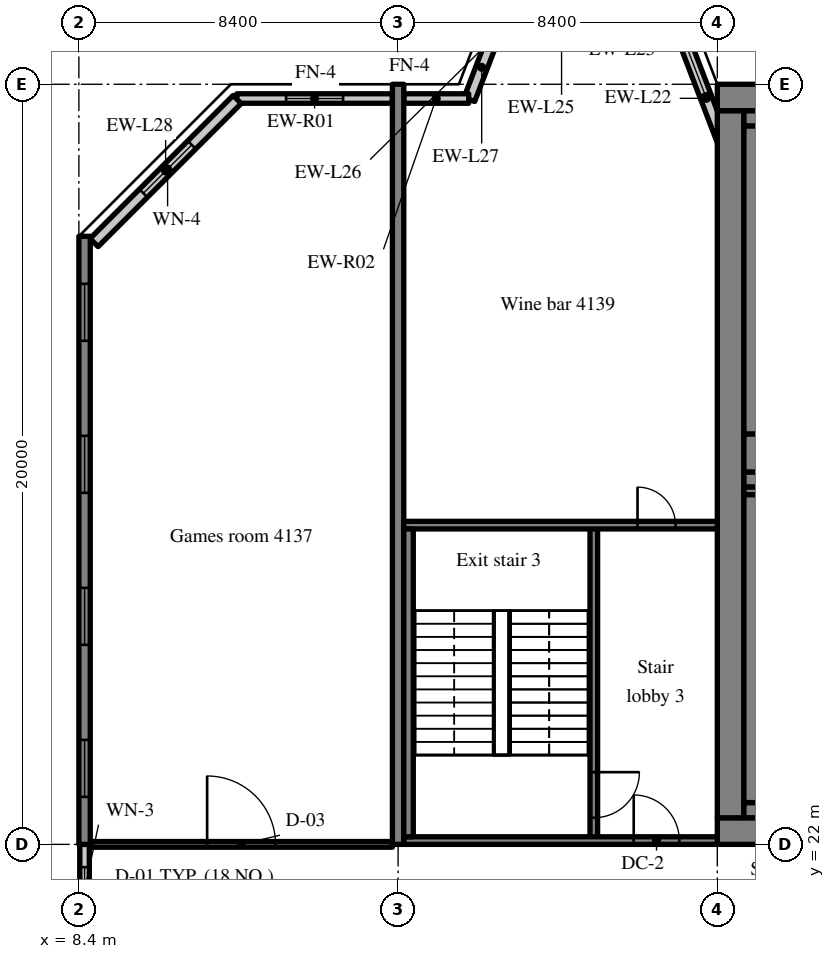
"""IFC4 building model, lengths in metres.
Left out: names, types, materials, properties, quantities, classifications, styles, units other than length and angle.
Written with IfcOpenShell. Run it as: python <this file> out.ifc"""

import sys

from ifc_helpers import new_model, si_unit, direction, frame, frame_2d, origin, place, context, subcontext, project, spatial, rectangle, extrude, source, transform, mapped, element, fill, save


model = new_model("IFC4")
c1 = context("Model", 3, precision=1e-05, world=origin(), true_north=direction((0.0, 1.0)))
c2 = subcontext(c1, "Body", "Model", "MODEL_VIEW")
j1 = project(units=[si_unit("LENGTHUNIT", "METRE"), si_unit("PLANEANGLEUNIT", "RADIAN")], contexts=[c1])
p1 = place(None, origin())
s1 = spatial("IfcSite", under=j1, at=p1, CompositionType="ELEMENT")
p2 = place(p1, origin())
s2 = spatial("IfcBuilding", under=s1, at=p2, CompositionType="ELEMENT")
p3 = place(p2, frame((0.0, 0.0, 170.6)))
s3 = spatial("IfcBuildingStorey", under=s2, at=p3, CompositionType="ELEMENT", Elevation=170.6)
m1 = source(origin(), c2, "Body", "SweptSolid", [
    extrude(rectangle(XDim=50.4, YDim=0.7, at=frame_2d((25.2, 0.0))), origin(), (0.0, 0.0, 1.0), 3.52),
])
p4 = place(p3, frame((25.2, 22.35, 0.0), z_axis=(0.0, 0.0, 1.0), x_axis=(1.0, 0.0, 0.0)))
e1 = element("IfcWall", 1, at=p4, inside=s3, PredefinedType="SHEAR", context=c2, shape_type="MappedRepresentation", body=[
    mapped(m1, transform((0.0, 0.0, 0.0), scale=1.0)),
])
m2 = source(origin(), c2, "Body", "SweptSolid", [
    extrude(rectangle(XDim=1.8, YDim=2.1, at=frame_2d((0.9, 1.05))), frame((0.0, 0.36, 0.0), z_axis=(0.0, -1.0, 0.0), x_axis=(1.0, 0.0, 0.0)), (0.0, 0.0, 1.0), 0.72),
])
p5 = place(p4, frame((15.9, 0.0, 0.0)))
e2 = element("IfcOpeningElement", 2, at=p5, cuts=e1, PredefinedType="OPENING", context=c2, shape_type="MappedRepresentation", body=[
    mapped(m2, transform((0.0, 0.0, 0.0), scale=1.0)),
])
m3 = source(origin(), c2, "Body", "SweptSolid", [
    extrude(rectangle(XDim=0.9, YDim=2.1, at=frame_2d((0.45, 1.05))), frame((0.0, 0.36, 0.0), z_axis=(0.0, -1.0, 0.0), x_axis=(1.0, 0.0, 0.0)), (0.0, 0.0, 1.0), 0.72),
])
p6 = place(p4, frame((9.7, 0.0, 0.0)))
e3 = element("IfcOpeningElement", 3, at=p6, cuts=e1, PredefinedType="OPENING", context=c2, shape_type="MappedRepresentation", body=[
    mapped(m3, transform((0.0, 0.0, 0.0), scale=1.0)),
])
p7 = place(p4, frame((21.5, 0.0, 0.0)))
e4 = element("IfcOpeningElement", 4, at=p7, cuts=e1, PredefinedType="OPENING", context=c2, shape_type="MappedRepresentation", body=[
    mapped(m3, transform((0.0, 0.0, 0.0), scale=1.0)),
])
p8 = place(p4, frame((32.7, 0.0, 0.0)))
e5 = element("IfcOpeningElement", 5, at=p8, cuts=e1, PredefinedType="OPENING", context=c2, shape_type="MappedRepresentation", body=[
    mapped(m2, transform((0.0, 0.0, 0.0), scale=1.0)),
])
m4 = source(origin(), c2, "Body", "SweptSolid", [
    extrude(rectangle(XDim=1.2, YDim=2.1, at=frame_2d((0.6, 1.05))), frame((0.0, 0.36, 0.0), z_axis=(0.0, -1.0, 0.0), x_axis=(1.0, 0.0, 0.0)), (0.0, 0.0, 1.0), 0.72),
])
p9 = place(p4, frame((6.475, 0.0, 0.0)))
e6 = element("IfcOpeningElement", 6, at=p9, cuts=e1, PredefinedType="OPENING", context=c2, shape_type="MappedRepresentation", body=[
    mapped(m4, transform((0.0, 0.0, 0.0), scale=1.0)),
])
p10 = place(p4, frame((47.875, 0.0, 0.0)))
e7 = element("IfcOpeningElement", 7, at=p10, cuts=e1, PredefinedType="OPENING", context=c2, shape_type="MappedRepresentation", body=[
    mapped(m4, transform((0.0, 0.0, 0.0), scale=1.0)),
])
p11 = place(p3, frame((25.2, 41.65, 0.0), z_axis=(0.0, 0.0, 1.0), x_axis=(1.0, 0.0, 0.0)))
e8 = element("IfcWall", 8, at=p11, inside=s3, PredefinedType="SHEAR", context=c2, shape_type="MappedRepresentation", body=[
    mapped(m1, transform((0.0, 0.0, 0.0), scale=1.0)),
])
m5 = source(origin(), c2, "Body", "SweptSolid", [
    extrude(rectangle(XDim=18.6, YDim=0.7, at=frame_2d((9.3, 0.0))), origin(), (0.0, 0.0, 1.0), 3.52),
])
p12 = place(p3, frame((25.55, 22.7, 0.0), z_axis=(0.0, 0.0, 1.0), x_axis=(0.0, 1.0, 0.0)))
e9 = element("IfcWall", 9, at=p12, inside=s3, PredefinedType="SHEAR", context=c2, shape_type="MappedRepresentation", body=[
    mapped(m5, transform((0.0, 0.0, 0.0), scale=1.0)),
])
m6 = source(origin(), c2, "Body", "SweptSolid", [
    extrude(rectangle(XDim=7.5, YDim=0.4, at=frame_2d((3.75, 0.0))), origin(), (0.0, 0.0, 1.0), 3.52),
])
p13 = place(p3, frame((25.9, 31.6, 0.0), z_axis=(0.0, 0.0, 1.0), x_axis=(1.0, 0.0, 0.0)))
e10 = element("IfcWall", 10, at=p13, inside=s3, PredefinedType="SHEAR", context=c2, shape_type="MappedRepresentation", body=[
    mapped(m6, transform((0.0, 0.0, 0.0), scale=1.0)),
])
m7 = source(origin(), c2, "Body", "SweptSolid", [
    extrude(rectangle(XDim=1.1, YDim=2.1, at=frame_2d((0.55, 1.05))), frame((0.0, 0.21, 0.0), z_axis=(0.0, -1.0, 0.0), x_axis=(1.0, 0.0, 0.0)), (0.0, 0.0, 1.0), 0.42),
])
p14 = place(p13, frame((5.825, 0.0, 0.0)))
e11 = element("IfcOpeningElement", 11, at=p14, cuts=e10, PredefinedType="OPENING", context=c2, shape_type="MappedRepresentation", body=[
    mapped(m7, transform((0.0, 0.0, 0.0), scale=1.0)),
])
m8 = source(origin(), c2, "Body", "SweptSolid", [
    extrude(rectangle(XDim=16.0, YDim=0.3, at=frame_2d((8.0, 0.0))), origin(), (0.0, 0.0, 1.0), 3.52),
])
p15 = place(p3, frame((8.55, 22.0, 0.0), z_axis=(0.0, 0.0, 1.0), x_axis=(0.0, 1.0, 0.0)))
e12 = element("IfcWall", 12, at=p15, inside=s3, PredefinedType="SHEAR", context=c2, shape_type="MappedRepresentation", body=[
    mapped(m8, transform((0.0, 0.0, 0.0), scale=1.0)),
])
m9 = source(origin(), c2, "Body", "SweptSolid", [
    extrude(rectangle(XDim=1.5, YDim=1.5, at=frame_2d((0.75, 0.75))), frame((0.0, 0.16, 0.0), z_axis=(0.0, -1.0, 0.0), x_axis=(1.0, 0.0, 0.0)), (0.0, 0.0, 1.0), 0.32),
])
p16 = place(p15, frame((1.25, 0.0, 0.9)))
e13 = element("IfcOpeningElement", 13, at=p16, cuts=e12, PredefinedType="OPENING", context=c2, shape_type="MappedRepresentation", body=[
    mapped(m9, transform((0.0, 0.0, 0.0), scale=1.0)),
])
p17 = place(p15, frame((5.25, 0.0, 0.9)))
e14 = element("IfcOpeningElement", 14, at=p17, cuts=e12, PredefinedType="OPENING", context=c2, shape_type="MappedRepresentation", body=[
    mapped(m9, transform((0.0, 0.0, 0.0), scale=1.0)),
])
p18 = place(p15, frame((9.25, 0.0, 0.9)))
e15 = element("IfcOpeningElement", 15, at=p18, cuts=e12, PredefinedType="OPENING", context=c2, shape_type="MappedRepresentation", body=[
    mapped(m9, transform((0.0, 0.0, 0.0), scale=1.0)),
])
p19 = place(p15, frame((13.25, 0.0, 0.9)))
e16 = element("IfcOpeningElement", 16, at=p19, cuts=e12, PredefinedType="OPENING", context=c2, shape_type="MappedRepresentation", body=[
    mapped(m9, transform((0.0, 0.0, 0.0), scale=1.0)),
])
m10 = source(origin(), c2, "Body", "SweptSolid", [
    extrude(rectangle(XDim=20.0, YDim=0.3, at=frame_2d((10.0, 0.0))), origin(), (0.0, 0.0, 1.0), 3.52),
])
p20 = place(p3, frame((16.8, 22.0, 0.0), z_axis=(0.0, 0.0, 1.0), x_axis=(0.0, 1.0, 0.0)))
e17 = element("IfcWall", 17, at=p20, inside=s3, PredefinedType="SHEAR", context=c2, shape_type="MappedRepresentation", body=[
    mapped(m10, transform((0.0, 0.0, 0.0), scale=1.0)),
])
m11 = source(origin(), c2, "Body", "SweptSolid", [
    extrude(rectangle(XDim=3.559, YDim=0.3, at=frame_2d((1.78, 0.0))), origin(), (0.0, 0.0, 1.0), 3.52),
])
p21 = place(p3, frame((25.55, 39.969, 0.0), z_axis=(0.0, 0.0, 1.0), x_axis=(-0.35779745313, 0.933799219604, 0.0)))
e18 = element("IfcWall", 18, at=p21, inside=s3, PredefinedType="SOLIDWALL", context=c2, shape_type="MappedRepresentation", body=[
    mapped(m11, transform((0.0, 0.0, 0.0), scale=1.0)),
])
m12 = source(origin(), c2, "Body", "SweptSolid", [
    extrude(rectangle(XDim=1.5, YDim=2.0, at=frame_2d((0.75, 1.0))), frame((0.0, 0.16, 0.0), z_axis=(0.0, -1.0, 0.0), x_axis=(1.0, 0.0, 0.0)), (0.0, 0.0, 1.0), 0.32),
])
p22 = place(p21, frame((1.903, 0.0, 0.9)))
e19 = element("IfcOpeningElement", 19, at=p22, cuts=e18, PredefinedType="OPENING", context=c2, shape_type="MappedRepresentation", body=[
    mapped(m12, transform((0.0, 0.0, 0.0), scale=1.0)),
])
m13 = source(origin(), c2, "Body", "SweptSolid", [
    extrude(rectangle(XDim=1.812, YDim=0.3, at=frame_2d((0.906, 0.0))), origin(), (0.0, 0.0, 1.0), 3.52),
])
p23 = place(p3, frame((19.323, 43.292, 0.0), z_axis=(0.0, 0.0, 1.0), x_axis=(-0.357877270961, -0.93376863244, 0.0)))
e20 = element("IfcWall", 20, at=p23, inside=s3, PredefinedType="SOLIDWALL", context=c2, shape_type="MappedRepresentation", body=[
    mapped(m13, transform((0.0, 0.0, 0.0), scale=1.0)),
])
m14 = source(origin(), c2, "Body", "SweptSolid", [
    extrude(rectangle(XDim=4.094, YDim=0.25, at=frame_2d((2.047, 0.0))), origin(), (0.0, 0.0, 1.0), 2.87),
])
p24 = place(p3, frame((16.65, 41.625, 0.0), z_axis=(0.0, 0.0, 1.0), x_axis=(-1.0, 0.0, 0.0)))
e21 = element("IfcWall", 21, at=p24, inside=s3, PredefinedType="SOLIDWALL", context=c2, shape_type="MappedRepresentation", body=[
    mapped(m14, transform((0.0, 0.0, 0.0), scale=1.0)),
])
m15 = source(origin(), c2, "Body", "SweptSolid", [
    extrude(rectangle(XDim=1.5, YDim=1.5, at=frame_2d((0.75, 0.75))), frame((0.0, 0.135, 0.0), z_axis=(0.0, -1.0, 0.0), x_axis=(1.0, 0.0, 0.0)), (0.0, 0.0, 1.0), 0.27),
])
p25 = place(p24, frame((1.297, 0.0, 0.9)))
e22 = element("IfcOpeningElement", 22, at=p25, cuts=e21, PredefinedType="OPENING", context=c2, shape_type="MappedRepresentation", body=[
    mapped(m15, transform((0.0, 0.0, 0.0), scale=1.0)),
])
m16 = source(origin(), c2, "Body", "SweptSolid", [
    extrude(rectangle(XDim=1.708, YDim=0.25, at=frame_2d((0.854, 0.0))), origin(), (0.0, 0.0, 1.0), 2.87),
])
p26 = place(p3, frame((18.658, 41.625, 0.0), z_axis=(0.0, 0.0, 1.0), x_axis=(-1.0, 0.0, 0.0)))
e23 = element("IfcWall", 23, at=p26, inside=s3, PredefinedType="SOLIDWALL", context=c2, shape_type="MappedRepresentation", body=[
    mapped(m16, transform((0.0, 0.0, 0.0), scale=1.0)),
])
m17 = source(origin(), c2, "Body", "SweptSolid", [
    extrude(rectangle(XDim=5.326, YDim=0.3, at=frame_2d((2.663, 0.0))), origin(), (0.0, 0.0, 1.0), 3.52),
])
p27 = place(p3, frame((12.566, 41.6, 0.0), z_axis=(0.0, 0.0, 1.0), x_axis=(-0.707083859269, -0.707129702361, 0.0)))
e24 = element("IfcWall", 24, at=p27, inside=s3, PredefinedType="SOLIDWALL", context=c2, shape_type="MappedRepresentation", body=[
    mapped(m17, transform((0.0, 0.0, 0.0), scale=1.0)),
])
m18 = source(origin(), c2, "Body", "SweptSolid", [
    extrude(rectangle(XDim=1.8, YDim=1.5, at=frame_2d((0.9, 0.75))), frame((0.0, 0.16, 0.0), z_axis=(0.0, -1.0, 0.0), x_axis=(1.0, 0.0, 0.0)), (0.0, 0.0, 1.0), 0.32),
])
p28 = place(p27, frame((1.689, 0.0, 0.9)))
e25 = element("IfcOpeningElement", 25, at=p28, cuts=e24, PredefinedType="OPENING", context=c2, shape_type="MappedRepresentation", body=[
    mapped(m18, transform((0.0, 0.0, 0.0), scale=1.0)),
])
m19 = source(origin(), c2, "Body", "SweptSolid", [
    extrude(rectangle(XDim=2.4, YDim=0.25, at=frame_2d((1.2, 0.0))), origin(), (0.0, 0.0, 1.0), 2.62),
])
p29 = place(p3, frame((8.55, 19.6, 0.0), z_axis=(0.0, 0.0, 1.0), x_axis=(0.0, 1.0, 0.0)))
e26 = element("IfcWall", 26, at=p29, inside=s3, PredefinedType="SOLIDWALL", context=c2, shape_type="MappedRepresentation", body=[
    mapped(m19, transform((0.0, 0.0, 0.0), scale=1.0)),
])
m20 = source(origin(), c2, "Body", "SweptSolid", [
    extrude(rectangle(XDim=1.2, YDim=1.5, at=frame_2d((0.6, 0.75))), frame((0.0, 0.135, 0.0), z_axis=(0.0, -1.0, 0.0), x_axis=(1.0, 0.0, 0.0)), (0.0, 0.0, 1.0), 0.27),
])
p30 = place(p29, frame((0.6, 0.0, 0.9)))
e27 = element("IfcOpeningElement", 27, at=p30, cuts=e26, PredefinedType="OPENING", context=c2, shape_type="MappedRepresentation", body=[
    mapped(m20, transform((0.0, 0.0, 0.0), scale=1.0)),
])
m21 = source(origin(), c2, "Body", "SweptSolid", [
    extrude(rectangle(XDim=8.3, YDim=0.2, at=frame_2d((4.15, 0.0))), origin(), (0.0, 0.0, 1.0), 3.52),
])
p31 = place(p3, frame((21.95, 22.1, 0.0), z_axis=(0.0, 0.0, 1.0), x_axis=(0.0, 1.0, 0.0)))
e28 = element("IfcWall", 28, at=p31, inside=s3, PredefinedType="SOLIDWALL", context=c2, shape_type="MappedRepresentation", body=[
    mapped(m21, transform((0.0, 0.0, 0.0), scale=1.0)),
])
m22 = source(origin(), c2, "Body", "SweptSolid", [
    extrude(rectangle(XDim=1.2, YDim=2.1, at=frame_2d((0.6, 1.05))), frame((0.0, 0.11, 0.0), z_axis=(0.0, -1.0, 0.0), x_axis=(1.0, 0.0, 0.0)), (0.0, 0.0, 1.0), 0.22),
])
p32 = place(p31, frame((0.6, 0.0, 0.0)))
e29 = element("IfcOpeningElement", 29, at=p32, cuts=e28, PredefinedType="OPENING", context=c2, shape_type="MappedRepresentation", body=[
    mapped(m22, transform((0.0, 0.0, 0.0), scale=1.0)),
])
m23 = source(origin(), c2, "Body", "SweptSolid", [
    extrude(rectangle(XDim=8.25, YDim=0.2, at=frame_2d((4.125, 0.0))), origin(), (0.0, 0.0, 1.0), 3.52),
])
p33 = place(p3, frame((16.95, 22.1, 0.0), z_axis=(0.0, 0.0, 1.0), x_axis=(1.0, 0.0, 0.0)))
e30 = element("IfcWall", 30, at=p33, inside=s3, PredefinedType="SOLIDWALL", context=c2, shape_type="MappedRepresentation", body=[
    mapped(m23, transform((0.0, 0.0, 0.0), scale=1.0)),
])
p34 = place(p33, frame((6.05, 0.0, 0.0)))
e31 = element("IfcOpeningElement", 31, at=p34, cuts=e30, PredefinedType="OPENING", context=c2, shape_type="MappedRepresentation", body=[
    mapped(m22, transform((0.0, 0.0, 0.0), scale=1.0)),
])
p35 = place(p3, frame((16.95, 30.4, 0.0), z_axis=(0.0, 0.0, 1.0), x_axis=(1.0, 0.0, 0.0)))
e32 = element("IfcWall", 32, at=p35, inside=s3, PredefinedType="SOLIDWALL", context=c2, shape_type="MappedRepresentation", body=[
    mapped(m23, transform((0.0, 0.0, 0.0), scale=1.0)),
])
m24 = source(origin(), c2, "Body", "SweptSolid", [
    extrude(rectangle(XDim=1.0, YDim=2.1, at=frame_2d((0.5, 1.05))), frame((0.0, 0.11, 0.0), z_axis=(0.0, -1.0, 0.0), x_axis=(1.0, 0.0, 0.0)), (0.0, 0.0, 1.0), 0.22),
])
p36 = place(p35, frame((6.15, 0.0, 0.0)))
e33 = element("IfcOpeningElement", 33, at=p36, cuts=e32, PredefinedType="OPENING", context=c2, shape_type="MappedRepresentation", body=[
    mapped(m24, transform((0.0, 0.0, 0.0), scale=1.0)),
])
m25 = source(origin(), c2, "Body", "SweptSolid", [
    extrude(rectangle(XDim=5.05, YDim=0.4, at=frame_2d((2.525, 0.0))), origin(), (0.0, 0.0, 1.0), 3.52),
])
p37 = place(p3, frame((25.9, 22.9, 0.0), z_axis=(0.0, 0.0, 1.0), x_axis=(1.0, 0.0, 0.0)))
e34 = element("IfcWall", 34, at=p37, inside=s3, PredefinedType="SOLIDWALL", context=c2, shape_type="MappedRepresentation", body=[
    mapped(m25, transform((0.0, 0.0, 0.0), scale=1.0)),
])
m26 = source(origin(), c2, "Body", "SweptSolid", [
    extrude(rectangle(XDim=5.05, YDim=0.2, at=frame_2d((2.525, 0.0))), origin(), (0.0, 0.0, 1.0), 3.52),
])
p38 = place(p3, frame((25.9, 31.3, 0.0), z_axis=(0.0, 0.0, 1.0), x_axis=(1.0, 0.0, 0.0)))
e35 = element("IfcWall", 35, at=p38, inside=s3, PredefinedType="SOLIDWALL", context=c2, shape_type="MappedRepresentation", body=[
    mapped(m26, transform((0.0, 0.0, 0.0), scale=1.0)),
])
m27 = source(origin(), c2, "Body", "SweptSolid", [
    extrude(rectangle(XDim=8.1, YDim=0.4, at=frame_2d((4.05, 0.0))), origin(), (0.0, 0.0, 1.0), 3.52),
])
p39 = place(p3, frame((26.1, 23.1, 0.0), z_axis=(0.0, 0.0, 1.0), x_axis=(0.0, 1.0, 0.0)))
e36 = element("IfcWall", 36, at=p39, inside=s3, PredefinedType="SOLIDWALL", context=c2, shape_type="MappedRepresentation", body=[
    mapped(m27, transform((0.0, 0.0, 0.0), scale=1.0)),
])
m28 = source(origin(), c2, "Body", "SweptSolid", [
    extrude(rectangle(XDim=8.1, YDim=0.25, at=frame_2d((4.05, 0.0))), origin(), (0.0, 0.0, 1.0), 3.52),
])
p40 = place(p3, frame((17.075, 22.2, 0.0), z_axis=(0.0, 0.0, 1.0), x_axis=(0.0, 1.0, 0.0)))
e37 = element("IfcWall", 37, at=p40, inside=s3, PredefinedType="SOLIDWALL", context=c2, shape_type="MappedRepresentation", body=[
    mapped(m28, transform((0.0, 0.0, 0.0), scale=1.0)),
])
p41 = place(p3, frame((25.9, 41.1, 0.0), z_axis=(0.0, 0.0, 1.0), x_axis=(1.0, 0.0, 0.0)))
e38 = element("IfcWall", 38, at=p41, inside=s3, PredefinedType="SOLIDWALL", context=c2, shape_type="MappedRepresentation", body=[
    mapped(m25, transform((0.0, 0.0, 0.0), scale=1.0)),
])
m29 = source(origin(), c2, "Body", "SweptSolid", [
    extrude(rectangle(XDim=5.05, YDim=1.0, at=frame_2d((2.525, 0.0))), origin(), (0.0, 0.0, 1.0), 3.52),
])
p42 = place(p3, frame((25.9, 32.3, 0.0), z_axis=(0.0, 0.0, 1.0), x_axis=(1.0, 0.0, 0.0)))
e39 = element("IfcWall", 39, at=p42, inside=s3, PredefinedType="SOLIDWALL", context=c2, shape_type="MappedRepresentation", body=[
    mapped(m29, transform((0.0, 0.0, 0.0), scale=1.0)),
])
p43 = place(p3, frame((26.1, 32.8, 0.0), z_axis=(0.0, 0.0, 1.0), x_axis=(0.0, 1.0, 0.0)))
e40 = element("IfcWall", 40, at=p43, inside=s3, PredefinedType="SOLIDWALL", context=c2, shape_type="MappedRepresentation", body=[
    mapped(m27, transform((0.0, 0.0, 0.0), scale=1.0)),
])
m30 = source(origin(), c2, "Body", "SweptSolid", [
    extrude(rectangle(XDim=7.95, YDim=0.15, at=frame_2d((3.975, 0.0))), origin(), (0.0, 0.0, 1.0), 2.82),
])
p44 = place(p3, frame((8.7, 22.0, 0.0), z_axis=(0.0, 0.0, 1.0), x_axis=(1.0, 0.0, 0.0)))
e41 = element("IfcWall", 41, at=p44, inside=s3, PredefinedType="PARTITIONING", context=c2, shape_type="MappedRepresentation", body=[
    mapped(m30, transform((0.0, 0.0, 0.0), scale=1.0)),
])
m31 = source(origin(), c2, "Body", "SweptSolid", [
    extrude(rectangle(XDim=1.8, YDim=2.1, at=frame_2d((0.9, 1.05))), frame((0.0, 0.085, 0.0), z_axis=(0.0, -1.0, 0.0), x_axis=(1.0, 0.0, 0.0)), (0.0, 0.0, 1.0), 0.17),
])
p45 = place(p44, frame((3.075, 0.0, 0.0)))
e42 = element("IfcOpeningElement", 42, at=p45, cuts=e41, PredefinedType="OPENING", context=c2, shape_type="MappedRepresentation", body=[
    mapped(m31, transform((0.0, 0.0, 0.0), scale=1.0)),
])
m32 = source(origin(), c2, "Body", "SweptSolid", [
    extrude(rectangle(XDim=1.5, YDim=2.0, at=frame_2d((0.75, 1.0))), frame((0.0, 0.03, 0.0), z_axis=(0.0, -1.0, 0.0), x_axis=(1.0, 0.0, 0.0)), (0.0, 0.0, 1.0), 0.06),
])
p46 = place(p22, origin())
e43 = element("IfcWindow", 43, at=p46, inside=s3, PartitioningType="SINGLE_PANEL", PredefinedType="WINDOW", context=c2, shape_type="MappedRepresentation", body=[
    mapped(m32, transform((0.0, 0.0, 0.0), scale=1.0)),
])
fill(e19, e43)
m33 = source(origin(), c2, "Body", "SweptSolid", [
    extrude(rectangle(XDim=1.5, YDim=1.5, at=frame_2d((0.75, 0.75))), frame((0.0, 0.03, 0.0), z_axis=(0.0, -1.0, 0.0), x_axis=(1.0, 0.0, 0.0)), (0.0, 0.0, 1.0), 0.06),
])
p47 = place(p25, origin())
e44 = element("IfcWindow", 44, at=p47, inside=s3, PartitioningType="SINGLE_PANEL", PredefinedType="WINDOW", context=c2, shape_type="MappedRepresentation", body=[
    mapped(m33, transform((0.0, 0.0, 0.0), scale=1.0)),
])
fill(e22, e44)
m34 = source(origin(), c2, "Body", "SweptSolid", [
    extrude(rectangle(XDim=1.8, YDim=1.5, at=frame_2d((0.9, 0.75))), frame((0.0, 0.03, 0.0), z_axis=(0.0, -1.0, 0.0), x_axis=(1.0, 0.0, 0.0)), (0.0, 0.0, 1.0), 0.06),
])
p48 = place(p28, origin())
e45 = element("IfcWindow", 45, at=p48, inside=s3, PartitioningType="SINGLE_PANEL", PredefinedType="WINDOW", context=c2, shape_type="MappedRepresentation", body=[
    mapped(m34, transform((0.0, 0.0, 0.0), scale=1.0)),
])
fill(e25, e45)
p49 = place(p16, origin())
e46 = element("IfcWindow", 46, at=p49, inside=s3, PartitioningType="SINGLE_PANEL", PredefinedType="WINDOW", context=c2, shape_type="MappedRepresentation", body=[
    mapped(m33, transform((0.0, 0.0, 0.0), scale=1.0)),
])
fill(e13, e46)
p50 = place(p17, origin())
e47 = element("IfcWindow", 47, at=p50, inside=s3, PartitioningType="SINGLE_PANEL", PredefinedType="WINDOW", context=c2, shape_type="MappedRepresentation", body=[
    mapped(m33, transform((0.0, 0.0, 0.0), scale=1.0)),
])
fill(e14, e47)
p51 = place(p18, origin())
e48 = element("IfcWindow", 48, at=p51, inside=s3, PartitioningType="SINGLE_PANEL", PredefinedType="WINDOW", context=c2, shape_type="MappedRepresentation", body=[
    mapped(m33, transform((0.0, 0.0, 0.0), scale=1.0)),
])
fill(e15, e48)
p52 = place(p19, origin())
e49 = element("IfcWindow", 49, at=p52, inside=s3, PartitioningType="SINGLE_PANEL", PredefinedType="WINDOW", context=c2, shape_type="MappedRepresentation", body=[
    mapped(m33, transform((0.0, 0.0, 0.0), scale=1.0)),
])
fill(e16, e49)
m35 = source(origin(), c2, "Body", "SweptSolid", [
    extrude(rectangle(XDim=1.2, YDim=1.5, at=frame_2d((0.6, 0.75))), frame((0.0, 0.03, 0.0), z_axis=(0.0, -1.0, 0.0), x_axis=(1.0, 0.0, 0.0)), (0.0, 0.0, 1.0), 0.06),
])
p53 = place(p30, origin())
e50 = element("IfcWindow", 50, at=p53, inside=s3, PartitioningType="SINGLE_PANEL", PredefinedType="WINDOW", context=c2, shape_type="MappedRepresentation", body=[
    mapped(m35, transform((0.0, 0.0, 0.0), scale=1.0)),
])
fill(e27, e50)
m36 = source(origin(), c2, "Body", "SweptSolid", [
    extrude(rectangle(XDim=1.2, YDim=2.1, at=frame_2d((0.6, 1.05))), frame((0.0, 0.025, 0.0), z_axis=(0.0, -1.0, 0.0), x_axis=(1.0, 0.0, 0.0)), (0.0, 0.0, 1.0), 0.05),
])
p54 = place(p32, origin())
e51 = element("IfcDoor", 51, at=p54, inside=s3, OperationType="SINGLE_SWING_RIGHT", PredefinedType="DOOR", context=c2, shape_type="MappedRepresentation", body=[
    mapped(m36, transform((0.0, 0.0, 0.0), scale=1.0)),
])
fill(e29, e51)
p55 = place(p34, origin())
e52 = element("IfcDoor", 52, at=p55, inside=s3, OperationType="SINGLE_SWING_LEFT", PredefinedType="DOOR", context=c2, shape_type="MappedRepresentation", body=[
    mapped(m36, transform((0.0, 0.0, 0.0), scale=1.0)),
])
fill(e31, e52)
m37 = source(origin(), c2, "Body", "SweptSolid", [
    extrude(rectangle(XDim=1.0, YDim=2.1, at=frame_2d((0.5, 1.05))), frame((0.0, 0.025, 0.0), z_axis=(0.0, -1.0, 0.0), x_axis=(1.0, 0.0, 0.0)), (0.0, 0.0, 1.0), 0.05),
])
p56 = place(p36, origin())
e53 = element("IfcDoor", 53, at=p56, inside=s3, OperationType="SINGLE_SWING_LEFT", PredefinedType="DOOR", context=c2, shape_type="MappedRepresentation", body=[
    mapped(m37, transform((0.0, 0.0, 0.0), scale=1.0)),
])
fill(e33, e53)
m38 = source(origin(), c2, "Body", "SweptSolid", [
    extrude(rectangle(XDim=1.8, YDim=2.1, at=frame_2d((0.9, 1.05))), frame((0.0, 0.025, 0.0), z_axis=(0.0, -1.0, 0.0), x_axis=(1.0, 0.0, 0.0)), (0.0, 0.0, 1.0), 0.05),
])
p57 = place(p45, origin())
e54 = element("IfcDoor", 54, at=p57, inside=s3, OperationType="DOUBLE_DOOR_SINGLE_SWING", PredefinedType="DOOR", context=c2, shape_type="MappedRepresentation", body=[
    mapped(m38, transform((0.0, 0.0, 0.0), scale=1.0)),
])
fill(e42, e54)
save(model, sys.argv[1])
